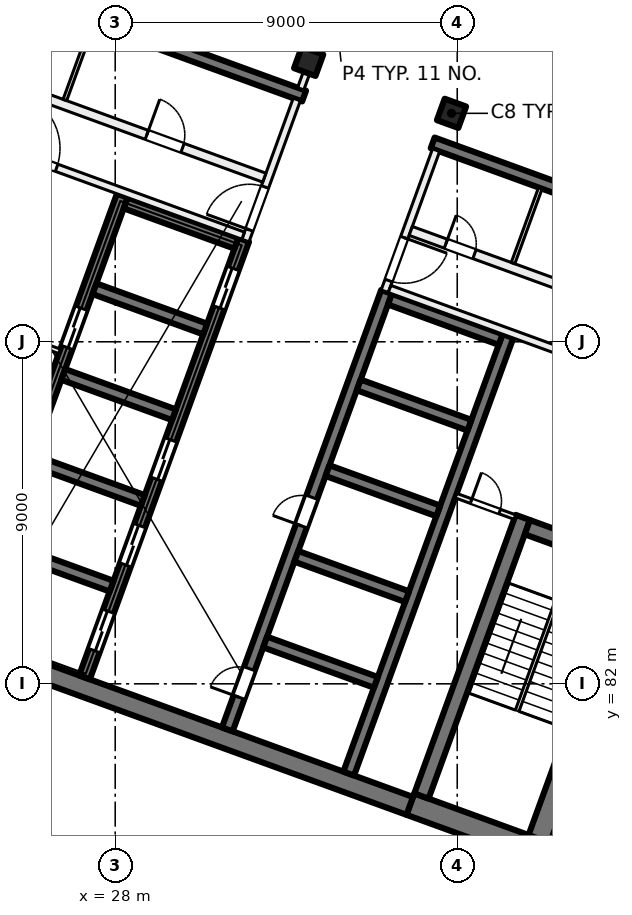
"""IFC4 building model, lengths in metres.
Left out: names, types, materials, properties, quantities, classifications, styles, units other than length and angle.
Written with IfcOpenShell. Run it as: python <this file> out.ifc"""

import sys

from ifc_helpers import new_model, si_unit, direction, frame, frame_2d, origin, origin_2d, place, context, subcontext, project, spatial, rectangle, extrude, element, fill, save


model = new_model("IFC4")
c1 = context("Model", 3, precision=1e-05, world=origin(), true_north=direction((0.0, 1.0)))
c2 = subcontext(c1, "Body", "Model", "MODEL_VIEW")
j1 = project(units=[si_unit("LENGTHUNIT", "METRE"), si_unit("PLANEANGLEUNIT", "RADIAN")], contexts=[c1])
p1 = place(None, origin())
s1 = spatial("IfcSite", under=j1, at=p1, CompositionType="ELEMENT")
p2 = place(p1, origin())
s2 = spatial("IfcBuilding", under=s1, at=p2, CompositionType="ELEMENT")
p3 = place(p2, frame((0.0, 0.0, 228.0)))
s3 = spatial("IfcBuildingStorey", under=s2, at=p3, CompositionType="ELEMENT", Elevation=228.0)
for number, where, z_axis, x_axis in (
    (1, (36.849, 97.011, 0.0), (0.0, 0.0, 1.0), (-0.342, -0.94, 0.0)),
    (2, (33.091, 98.379, 0.0), (0.0, 0.0, 1.0), (-0.342, -0.94, 0.0)),
):
    element("IfcColumn", number, at=place(p3, frame(where, z_axis=z_axis, x_axis=x_axis)), inside=s3, PredefinedType="COLUMN", context=c2, shape_type="SweptSolid", body=[
        extrude(rectangle(XDim=0.6, YDim=0.6, at=origin_2d()), origin(), (0.0, 0.0, 1.0), 4.0),
    ])
p4 = place(p3, frame((39.338, 77.535, 0.0), z_axis=(0.0, 0.0, 1.0), x_axis=(-0.939701471648, 0.341995824804, 0.0)))
e3 = element("IfcWall", 3, at=p4, inside=s3, PredefinedType="SHEAR", context=c2, shape_type="SweptSolid", body=[
    extrude(rectangle(XDim=3.8, YDim=0.6, at=frame_2d((1.9, 0.0))), origin(), (0.0, 0.0, 1.0), 4.0),
])
p5 = place(p3, frame((35.75, 78.788, 0.0), z_axis=(0.0, 0.0, 1.0), x_axis=(-0.939692894512, 0.342019391267, 0.0)))
e4 = element("IfcWall", 4, at=p5, inside=s3, PredefinedType="SHEAR", context=c2, shape_type="SweptSolid", body=[
    extrude(rectangle(XDim=14.4, YDim=0.5, at=frame_2d((7.2, 0.0))), origin(), (0.0, 0.0, 1.0), 4.0),
])
p6 = place(p3, frame((39.159, 77.92, 0.0), z_axis=(0.0, 0.0, 1.0), x_axis=(0.342016982193, 0.939693771338, 0.0)))
e5 = element("IfcWall", 5, at=p6, inside=s3, PredefinedType="SHEAR", context=c2, shape_type="SweptSolid", body=[
    extrude(rectangle(XDim=7.8, YDim=0.6, at=frame_2d((3.9, 0.0))), origin(), (0.0, 0.0, 1.0), 4.0),
])
p7 = place(p3, frame((36.058, 79.048, 0.0), z_axis=(0.0, 0.0, 1.0), x_axis=(0.342016982193, 0.939693771338, 0.0)))
e6 = element("IfcWall", 6, at=p7, inside=s3, PredefinedType="SHEAR", context=c2, shape_type="SweptSolid", body=[
    extrude(rectangle(XDim=7.8, YDim=0.4, at=frame_2d((3.9, 0.0))), origin(), (0.0, 0.0, 1.0), 4.0),
])
p8 = place(p3, frame((41.476, 85.164, 0.0), z_axis=(0.0, 0.0, 1.0), x_axis=(-0.939678810556, 0.342058084236, 0.0)))
e7 = element("IfcWall", 7, at=p8, inside=s3, PredefinedType="SHEAR", context=c2, shape_type="SweptSolid", body=[
    extrude(rectangle(XDim=2.8, YDim=0.4, at=frame_2d((1.4, 0.0))), origin(), (0.0, 0.0, 1.0), 4.0),
])
p9 = place(p8, frame((0.85, 0.0, 0.0)))
e8 = element("IfcOpeningElement", 8, at=p9, cuts=e7, PredefinedType="OPENING", context=c2, shape_type="SweptSolid", body=[
    extrude(rectangle(XDim=1.0, YDim=2.1, at=frame_2d((0.5, 1.05))), frame((0.0, 0.21, 0.0), z_axis=(0.0, -1.0, 0.0), x_axis=(1.0, 0.0, 0.0)), (0.0, 0.0, 1.0), 0.42),
])
p10 = place(p3, frame((30.949, 80.801, 0.0), z_axis=(0.0, 0.0, 1.0), x_axis=(0.342016684409, 0.939693879721, 0.0)))
e9 = element("IfcWall", 9, at=p10, inside=s3, PredefinedType="SHEAR", context=c2, shape_type="SweptSolid", body=[
    extrude(rectangle(XDim=12.25, YDim=0.3, at=frame_2d((6.125, 0.0))), origin(), (0.0, 0.0, 1.0), 4.0),
])
p11 = place(p10, frame((0.9, 0.0, 0.0)))
e10 = element("IfcOpeningElement", 10, at=p11, cuts=e9, PredefinedType="OPENING", context=c2, shape_type="SweptSolid", body=[
    extrude(rectangle(XDim=0.8, YDim=2.1, at=frame_2d((0.4, 1.05))), frame((0.0, 0.16, 0.0), z_axis=(0.0, -1.0, 0.0), x_axis=(1.0, 0.0, 0.0)), (0.0, 0.0, 1.0), 0.32),
])
p12 = place(p10, frame((5.7, 0.0, 0.0)))
e11 = element("IfcOpeningElement", 11, at=p12, cuts=e9, PredefinedType="OPENING", context=c2, shape_type="SweptSolid", body=[
    extrude(rectangle(XDim=0.8, YDim=2.1, at=frame_2d((0.4, 1.05))), frame((0.0, 0.16, 0.0), z_axis=(0.0, -1.0, 0.0), x_axis=(1.0, 0.0, 0.0)), (0.0, 0.0, 1.0), 0.32),
])
p13 = place(p3, frame((34.144, 79.638, 0.0), z_axis=(0.0, 0.0, 1.0), x_axis=(0.342016684409, 0.939693879721, 0.0)))
e12 = element("IfcWall", 12, at=p13, inside=s3, PredefinedType="SHEAR", context=c2, shape_type="SweptSolid", body=[
    extrude(rectangle(XDim=12.25, YDim=0.3, at=frame_2d((6.125, 0.0))), origin(), (0.0, 0.0, 1.0), 4.0),
])
p14 = place(p3, frame((34.858, 82.039, 0.0), z_axis=(0.0, 0.0, 1.0), x_axis=(-0.939689908313, 0.342027595692, 0.0)))
e13 = element("IfcWall", 13, at=p14, inside=s3, PredefinedType="SHEAR", context=c2, shape_type="SweptSolid", body=[
    extrude(rectangle(XDim=3.1, YDim=0.3, at=frame_2d((1.55, 0.0))), origin(), (0.0, 0.0, 1.0), 4.0),
])
p15 = place(p3, frame((35.679, 84.294, 0.0), z_axis=(0.0, 0.0, 1.0), x_axis=(-0.939706007505, 0.341983361377, 0.0)))
e14 = element("IfcWall", 14, at=p15, inside=s3, PredefinedType="SHEAR", context=c2, shape_type="SweptSolid", body=[
    extrude(rectangle(XDim=3.1, YDim=0.3, at=frame_2d((1.55, 0.0))), origin(), (0.0, 0.0, 1.0), 4.0),
])
for number, where, z_axis, x_axis in (
    (15, (36.5, 86.549, 0.0), (0.0, 0.0, 1.0), (-0.94, 0.342, 0.0)),
    (16, (37.321, 88.805, 0.0), (0.0, 0.0, 1.0), (-0.94, 0.342, 0.0)),
    (17, (38.142, 91.06, 0.0), (0.0, 0.0, 1.0), (-0.94, 0.342, 0.0)),
):
    element("IfcWall", number, at=place(p3, frame(where, z_axis=z_axis, x_axis=x_axis)), inside=s3, PredefinedType="SHEAR", context=c2, shape_type="SweptSolid", body=[
        extrude(rectangle(XDim=3.1, YDim=0.3, at=frame_2d((1.55, 0.0))), origin(), (0.0, 0.0, 1.0), 4.0),
    ])
p16 = place(p3, frame((27.191, 82.169, 0.0), z_axis=(0.0, 0.0, 1.0), x_axis=(0.342016684409, 0.939693879721, 0.0)))
e18 = element("IfcWall", 18, at=p16, inside=s3, PredefinedType="SHEAR", context=c2, shape_type="SweptSolid", body=[
    extrude(rectangle(XDim=12.25, YDim=0.3, at=frame_2d((6.125, 0.0))), origin(), (0.0, 0.0, 1.0), 4.0),
])
p17 = place(p16, frame((0.75, 0.0, 0.0)))
e19 = element("IfcOpeningElement", 19, at=p17, cuts=e18, PredefinedType="OPENING", context=c2, shape_type="SweptSolid", body=[
    extrude(rectangle(XDim=1.1, YDim=2.1, at=frame_2d((0.55, 1.05))), frame((0.0, 0.16, 0.0), z_axis=(0.0, -1.0, 0.0), x_axis=(1.0, 0.0, 0.0)), (0.0, 0.0, 1.0), 0.32),
])
p18 = place(p16, frame((3.15, 0.0, 0.0)))
e20 = element("IfcOpeningElement", 20, at=p18, cuts=e18, PredefinedType="OPENING", context=c2, shape_type="SweptSolid", body=[
    extrude(rectangle(XDim=1.1, YDim=2.1, at=frame_2d((0.55, 1.05))), frame((0.0, 0.16, 0.0), z_axis=(0.0, -1.0, 0.0), x_axis=(1.0, 0.0, 0.0)), (0.0, 0.0, 1.0), 0.32),
])
p19 = place(p16, frame((5.55, 0.0, 0.0)))
e21 = element("IfcOpeningElement", 21, at=p19, cuts=e18, PredefinedType="OPENING", context=c2, shape_type="SweptSolid", body=[
    extrude(rectangle(XDim=1.1, YDim=2.1, at=frame_2d((0.55, 1.05))), frame((0.0, 0.16, 0.0), z_axis=(0.0, -1.0, 0.0), x_axis=(1.0, 0.0, 0.0)), (0.0, 0.0, 1.0), 0.32),
])
p20 = place(p16, frame((10.35, 0.0, 0.0)))
e22 = element("IfcOpeningElement", 22, at=p20, cuts=e18, PredefinedType="OPENING", context=c2, shape_type="SweptSolid", body=[
    extrude(rectangle(XDim=1.1, YDim=2.1, at=frame_2d((0.55, 1.05))), frame((0.0, 0.16, 0.0), z_axis=(0.0, -1.0, 0.0), x_axis=(1.0, 0.0, 0.0)), (0.0, 0.0, 1.0), 0.32),
])
p21 = place(p3, frame((23.996, 83.332, 0.0), z_axis=(0.0, 0.0, 1.0), x_axis=(0.342016684409, 0.939693879721, 0.0)))
e23 = element("IfcWall", 23, at=p21, inside=s3, PredefinedType="SHEAR", context=c2, shape_type="SweptSolid", body=[
    extrude(rectangle(XDim=12.25, YDim=0.3, at=frame_2d((6.125, 0.0))), origin(), (0.0, 0.0, 1.0), 4.0),
])
p22 = place(p21, frame((8.0, 0.0, 0.0)))
e24 = element("IfcOpeningElement", 24, at=p22, cuts=e23, PredefinedType="OPENING", context=c2, shape_type="SweptSolid", body=[
    extrude(rectangle(XDim=1.1, YDim=2.1, at=frame_2d((0.55, 1.05))), frame((0.0, 0.16, 0.0), z_axis=(0.0, -1.0, 0.0), x_axis=(1.0, 0.0, 0.0)), (0.0, 0.0, 1.0), 0.32),
])
for number, where, z_axis, x_axis in (
    (25, (27.905, 84.57, 0.0), (0.0, 0.0, 1.0), (-0.94, 0.342, 0.0)),
    (26, (28.726, 86.825, 0.0), (0.0, 0.0, 1.0), (-0.94, 0.342, 0.0)),
    (27, (29.546, 89.08, 0.0), (0.0, 0.0, 1.0), (-0.94, 0.342, 0.0)),
):
    element("IfcWall", number, at=place(p3, frame(where, z_axis=z_axis, x_axis=x_axis)), inside=s3, PredefinedType="SHEAR", context=c2, shape_type="SweptSolid", body=[
        extrude(rectangle(XDim=3.1, YDim=0.3, at=frame_2d((1.55, 0.0))), origin(), (0.0, 0.0, 1.0), 4.0),
    ])
for number, where, z_axis, x_axis in (
    (28, (30.367, 91.336, 0.0), (0.0, 0.0, 1.0), (-0.94, 0.342, 0.0)),
    (29, (31.188, 93.591, 0.0), (0.0, 0.0, 1.0), (-0.94, 0.342, 0.0)),
):
    element("IfcWall", number, at=place(p3, frame(where, z_axis=z_axis, x_axis=x_axis)), inside=s3, PredefinedType="SHEAR", context=c2, shape_type="SweptSolid", body=[
        extrude(rectangle(XDim=3.1, YDim=0.3, at=frame_2d((1.55, 0.0))), origin(), (0.0, 0.0, 1.0), 4.0),
    ])
p23 = place(p3, frame((44.529, 93.258, 0.0), z_axis=(0.0, 0.0, 1.0), x_axis=(-0.9396917844, 0.342022441267, 0.0)))
e30 = element("IfcWall", 30, at=p23, inside=s3, PredefinedType="SHEAR", context=c2, shape_type="SweptSolid", body=[
    extrude(rectangle(XDim=8.7, YDim=0.3, at=frame_2d((4.35, 0.0))), origin(), (0.0, 0.0, 1.0), 4.0),
])
p24 = place(p3, frame((32.971, 97.465, 0.0), z_axis=(0.0, 0.0, 1.0), x_axis=(-0.939695066972, 0.34201342241, 0.0)))
e31 = element("IfcWall", 31, at=p24, inside=s3, PredefinedType="SHEAR", context=c2, shape_type="SweptSolid", body=[
    extrude(rectangle(XDim=8.7, YDim=0.3, at=frame_2d((4.35, 0.0))), origin(), (0.0, 0.0, 1.0), 4.0),
])
p25 = place(p3, frame((31.427, 93.663, 0.0), z_axis=(0.0, 0.0, 1.0), x_axis=(0.342030870568, 0.93968871632, 0.0)))
e32 = element("IfcWall", 32, at=p25, inside=s3, PredefinedType="PARTITIONING", context=c2, shape_type="SweptSolid", body=[
    extrude(rectangle(XDim=3.95, YDim=0.2, at=frame_2d((1.975, 0.0))), origin(), (0.0, 0.0, 1.0), 3.625),
])
p26 = place(p25, frame((0.3, 0.0, 0.0)))
e33 = element("IfcOpeningElement", 33, at=p26, cuts=e32, PredefinedType="OPENING", context=c2, shape_type="SweptSolid", body=[
    extrude(rectangle(XDim=1.2, YDim=2.1, at=frame_2d((0.6, 1.05))), frame((0.0, 0.11, 0.0), z_axis=(0.0, -1.0, 0.0), x_axis=(1.0, 0.0, 0.0)), (0.0, 0.0, 1.0), 0.22),
])
p27 = place(p3, frame((23.427, 96.682, 0.0), z_axis=(0.0, 0.0, 1.0), x_axis=(0.939690465531, -0.342026064782, 0.0)))
e34 = element("IfcWall", 34, at=p27, inside=s3, PredefinedType="PARTITIONING", context=c2, shape_type="SweptSolid", body=[
    extrude(rectangle(XDim=8.45, YDim=0.2, at=frame_2d((4.225, 0.0))), origin(), (0.0, 0.0, 1.0), 3.625),
])
p28 = place(p27, frame((1.725, 0.0, 0.0)))
e35 = element("IfcOpeningElement", 35, at=p28, cuts=e34, PredefinedType="OPENING", context=c2, shape_type="SweptSolid", body=[
    extrude(rectangle(XDim=1.5, YDim=2.1, at=frame_2d((0.75, 1.05))), frame((0.0, 0.11, 0.0), z_axis=(0.0, -1.0, 0.0), x_axis=(1.0, 0.0, 0.0)), (0.0, 0.0, 1.0), 0.22),
])
p29 = place(p3, frame((23.983, 98.208, 0.0), z_axis=(0.0, 0.0, 1.0), x_axis=(0.939699751196, -0.342000552051, 0.0)))
e36 = element("IfcWall", 36, at=p29, inside=s3, PredefinedType="PARTITIONING", context=c2, shape_type="SweptSolid", body=[
    extrude(rectangle(XDim=8.45, YDim=0.25, at=frame_2d((4.225, 0.0))), origin(), (0.0, 0.0, 1.0), 3.625),
])
p30 = place(p29, frame((5.16, 0.0, 0.0)))
e37 = element("IfcOpeningElement", 37, at=p30, cuts=e36, PredefinedType="OPENING", context=c2, shape_type="SweptSolid", body=[
    extrude(rectangle(XDim=1.0, YDim=2.1, at=frame_2d((0.5, 1.05))), frame((0.0, 0.135, 0.0), z_axis=(0.0, -1.0, 0.0), x_axis=(1.0, 0.0, 0.0)), (0.0, 0.0, 1.0), 0.27),
])
p31 = place(p29, frame((0.885, 0.0, 0.0)))
e38 = element("IfcOpeningElement", 38, at=p31, cuts=e36, PredefinedType="OPENING", context=c2, shape_type="SweptSolid", body=[
    extrude(rectangle(XDim=1.0, YDim=2.1, at=frame_2d((0.5, 1.05))), frame((0.0, 0.135, 0.0), z_axis=(0.0, -1.0, 0.0), x_axis=(1.0, 0.0, 0.0)), (0.0, 0.0, 1.0), 0.27),
])
p32 = place(p3, frame((24.985, 91.312, 0.0), z_axis=(0.0, 0.0, 1.0), x_axis=(0.939719959755, -0.341945020783, 0.0)))
e39 = element("IfcWall", 39, at=p32, inside=s3, PredefinedType="PARTITIONING", context=c2, shape_type="SweptSolid", body=[
    extrude(rectangle(XDim=1.65, YDim=0.125, at=frame_2d((0.825, 0.0))), origin(), (0.0, 0.0, 1.0), 3.625),
])
p33 = place(p32, frame((0.425, 0.0, 0.0)))
e40 = element("IfcOpeningElement", 40, at=p33, cuts=e39, PredefinedType="OPENING", context=c2, shape_type="SweptSolid", body=[
    extrude(rectangle(XDim=0.8, YDim=2.1, at=frame_2d((0.4, 1.05))), frame((0.0, 0.073, 0.0), z_axis=(0.0, -1.0, 0.0), x_axis=(1.0, 0.0, 0.0)), (0.0, 0.0, 1.0), 0.145),
])
p34 = place(p3, frame((26.676, 97.362, 0.0), z_axis=(0.0, 0.0, 1.0), x_axis=(0.342023078919, 0.939691552312, 0.0)))
e41 = element("IfcWall", 41, at=p34, inside=s3, PredefinedType="PARTITIONING", context=c2, shape_type="SweptSolid", body=[
    extrude(rectangle(XDim=2.1, YDim=0.1, at=frame_2d((1.05, 0.0))), origin(), (0.0, 0.0, 1.0), 3.625),
])
p35 = place(p3, frame((36.443, 96.041, 0.0), z_axis=(0.0, 0.0, 1.0), x_axis=(-0.341996156931, -0.939701350773, 0.0)))
e42 = element("IfcWall", 42, at=p35, inside=s3, PredefinedType="PARTITIONING", context=c2, shape_type="SweptSolid", body=[
    extrude(rectangle(XDim=3.95, YDim=0.2, at=frame_2d((1.975, 0.0))), origin(), (0.0, 0.0, 1.0), 3.625),
])
p36 = place(p35, frame((2.45, 0.0, 0.0)))
e43 = element("IfcOpeningElement", 43, at=p36, cuts=e42, PredefinedType="OPENING", context=c2, shape_type="SweptSolid", body=[
    extrude(rectangle(XDim=1.2, YDim=2.1, at=frame_2d((0.6, 1.05))), frame((0.0, 0.11, 0.0), z_axis=(0.0, -1.0, 0.0), x_axis=(1.0, 0.0, 0.0)), (0.0, 0.0, 1.0), 0.22),
])
p37 = place(p3, frame((35.22, 92.389, 0.0), z_axis=(0.0, 0.0, 1.0), x_axis=(0.939690465531, -0.342026064782, 0.0)))
e44 = element("IfcWall", 44, at=p37, inside=s3, PredefinedType="PARTITIONING", context=c2, shape_type="SweptSolid", body=[
    extrude(rectangle(XDim=8.45, YDim=0.2, at=frame_2d((4.225, 0.0))), origin(), (0.0, 0.0, 1.0), 3.625),
])
p38 = place(p37, frame((5.225, 0.0, 0.0)))
e45 = element("IfcOpeningElement", 45, at=p38, cuts=e44, PredefinedType="OPENING", context=c2, shape_type="SweptSolid", body=[
    extrude(rectangle(XDim=1.5, YDim=2.1, at=frame_2d((0.75, 1.05))), frame((0.0, 0.11, 0.0), z_axis=(0.0, -1.0, 0.0), x_axis=(1.0, 0.0, 0.0)), (0.0, 0.0, 1.0), 0.22),
])
p39 = place(p3, frame((35.776, 93.916, 0.0), z_axis=(0.0, 0.0, 1.0), x_axis=(0.939690465531, -0.342026064782, 0.0)))
e46 = element("IfcWall", 46, at=p39, inside=s3, PredefinedType="PARTITIONING", context=c2, shape_type="SweptSolid", body=[
    extrude(rectangle(XDim=8.45, YDim=0.25, at=frame_2d((4.225, 0.0))), origin(), (0.0, 0.0, 1.0), 3.625),
])
p40 = place(p39, frame((0.985, 0.0, 0.0)))
e47 = element("IfcOpeningElement", 47, at=p40, cuts=e46, PredefinedType="OPENING", context=c2, shape_type="SweptSolid", body=[
    extrude(rectangle(XDim=0.8, YDim=2.1, at=frame_2d((0.4, 1.05))), frame((0.0, 0.135, 0.0), z_axis=(0.0, -1.0, 0.0), x_axis=(1.0, 0.0, 0.0)), (0.0, 0.0, 1.0), 0.27),
])
p41 = place(p39, frame((5.26, 0.0, 0.0)))
e48 = element("IfcOpeningElement", 48, at=p41, cuts=e46, PredefinedType="OPENING", context=c2, shape_type="SweptSolid", body=[
    extrude(rectangle(XDim=0.8, YDim=2.1, at=frame_2d((0.4, 1.05))), frame((0.0, 0.135, 0.0), z_axis=(0.0, -1.0, 0.0), x_axis=(1.0, 0.0, 0.0)), (0.0, 0.0, 1.0), 0.27),
])
p42 = place(p3, frame((36.966, 86.952, 0.0), z_axis=(0.0, 0.0, 1.0), x_axis=(0.939672407396, -0.342075674051, 0.0)))
e49 = element("IfcWall", 49, at=p42, inside=s3, PredefinedType="PARTITIONING", context=c2, shape_type="SweptSolid", body=[
    extrude(rectangle(XDim=1.65, YDim=0.125, at=frame_2d((0.825, 0.0))), origin(), (0.0, 0.0, 1.0), 3.625),
])
p43 = place(p42, frame((0.425, 0.0, 0.0)))
e50 = element("IfcOpeningElement", 50, at=p43, cuts=e49, PredefinedType="OPENING", context=c2, shape_type="SweptSolid", body=[
    extrude(rectangle(XDim=0.8, YDim=2.1, at=frame_2d((0.4, 1.05))), frame((0.0, 0.073, 0.0), z_axis=(0.0, -1.0, 0.0), x_axis=(1.0, 0.0, 0.0)), (0.0, 0.0, 1.0), 0.145),
])
p44 = place(p3, frame((39.187, 95.042, 0.0), z_axis=(0.0, 0.0, 1.0), x_axis=(-0.342023078919, -0.939691552312, 0.0)))
e51 = element("IfcWall", 51, at=p44, inside=s3, PredefinedType="PARTITIONING", context=c2, shape_type="SweptSolid", body=[
    extrude(rectangle(XDim=2.1, YDim=0.1, at=frame_2d((1.05, 0.0))), origin(), (0.0, 0.0, 1.0), 3.625),
])
p45 = place(p3, frame((32.881, 97.657, 0.0), z_axis=(0.0, 0.0, 1.0), x_axis=(0.342058204353, 0.939678766832, 0.0)))
e52 = element("IfcWall", 52, at=p45, inside=s3, PredefinedType="PARTITIONING", context=c2, shape_type="SweptSolid", body=[
    extrude(rectangle(XDim=5.163, YDim=0.175, at=frame_2d((2.581, 0.0))), origin(), (0.0, 0.0, 1.0), 3.625),
])
p46 = place(p45, frame((1.991, 0.0, 0.0)))
e53 = element("IfcOpeningElement", 53, at=p46, cuts=e52, PredefinedType="OPENING", context=c2, shape_type="SweptSolid", body=[
    extrude(rectangle(XDim=1.2, YDim=2.1, at=frame_2d((0.6, 1.05))), frame((0.0, 0.097, 0.0), z_axis=(0.0, -1.0, 0.0), x_axis=(1.0, 0.0, 0.0)), (0.0, 0.0, 1.0), 0.195),
])
p47 = place(p17, origin())
e54 = element("IfcDoor", 54, at=p47, inside=s3, OperationType="DOUBLE_DOOR_SLIDING", PredefinedType="DOOR", context=c2, shape_type="SweptSolid", body=[
    extrude(rectangle(XDim=1.1, YDim=2.1, at=frame_2d((0.55, 1.05))), frame((0.0, 0.025, 0.0), z_axis=(0.0, -1.0, 0.0), x_axis=(1.0, 0.0, 0.0)), (0.0, 0.0, 1.0), 0.05),
])
fill(e19, e54)
p48 = place(p18, origin())
e55 = element("IfcDoor", 55, at=p48, inside=s3, OperationType="DOUBLE_DOOR_SLIDING", PredefinedType="DOOR", context=c2, shape_type="SweptSolid", body=[
    extrude(rectangle(XDim=1.1, YDim=2.1, at=frame_2d((0.55, 1.05))), frame((0.0, 0.025, 0.0), z_axis=(0.0, -1.0, 0.0), x_axis=(1.0, 0.0, 0.0)), (0.0, 0.0, 1.0), 0.05),
])
fill(e20, e55)
p49 = place(p19, origin())
e56 = element("IfcDoor", 56, at=p49, inside=s3, OperationType="DOUBLE_DOOR_SLIDING", PredefinedType="DOOR", context=c2, shape_type="SweptSolid", body=[
    extrude(rectangle(XDim=1.1, YDim=2.1, at=frame_2d((0.55, 1.05))), frame((0.0, 0.025, 0.0), z_axis=(0.0, -1.0, 0.0), x_axis=(1.0, 0.0, 0.0)), (0.0, 0.0, 1.0), 0.05),
])
fill(e21, e56)
p50 = place(p20, origin())
e57 = element("IfcDoor", 57, at=p50, inside=s3, OperationType="DOUBLE_DOOR_SLIDING", PredefinedType="DOOR", context=c2, shape_type="SweptSolid", body=[
    extrude(rectangle(XDim=1.1, YDim=2.1, at=frame_2d((0.55, 1.05))), frame((0.0, 0.025, 0.0), z_axis=(0.0, -1.0, 0.0), x_axis=(1.0, 0.0, 0.0)), (0.0, 0.0, 1.0), 0.05),
])
fill(e22, e57)
p51 = place(p11, origin())
e58 = element("IfcDoor", 58, at=p51, inside=s3, OperationType="SINGLE_SWING_LEFT", PredefinedType="DOOR", context=c2, shape_type="SweptSolid", body=[
    extrude(rectangle(XDim=0.8, YDim=2.1, at=frame_2d((0.4, 1.05))), frame((0.0, 0.025, 0.0), z_axis=(0.0, -1.0, 0.0), x_axis=(1.0, 0.0, 0.0)), (0.0, 0.0, 1.0), 0.05),
])
fill(e10, e58)
p52 = place(p12, origin())
e59 = element("IfcDoor", 59, at=p52, inside=s3, OperationType="SINGLE_SWING_RIGHT", PredefinedType="DOOR", context=c2, shape_type="SweptSolid", body=[
    extrude(rectangle(XDim=0.8, YDim=2.1, at=frame_2d((0.4, 1.05))), frame((0.0, 0.025, 0.0), z_axis=(0.0, -1.0, 0.0), x_axis=(1.0, 0.0, 0.0)), (0.0, 0.0, 1.0), 0.05),
])
fill(e11, e59)
p53 = place(p26, origin())
e60 = element("IfcDoor", 60, at=p53, inside=s3, OperationType="DOUBLE_DOOR_SINGLE_SWING", PredefinedType="DOOR", context=c2, shape_type="SweptSolid", body=[
    extrude(rectangle(XDim=1.2, YDim=2.1, at=frame_2d((0.6, 1.05))), frame((0.0, 0.025, 0.0), z_axis=(0.0, -1.0, 0.0), x_axis=(1.0, 0.0, 0.0)), (0.0, 0.0, 1.0), 0.05),
])
fill(e33, e60)
p54 = place(p28, origin())
e61 = element("IfcDoor", 61, at=p54, inside=s3, OperationType="DOUBLE_DOOR_SINGLE_SWING", PredefinedType="DOOR", context=c2, shape_type="SweptSolid", body=[
    extrude(rectangle(XDim=1.5, YDim=2.1, at=frame_2d((0.75, 1.05))), frame((0.0, 0.025, 0.0), z_axis=(0.0, -1.0, 0.0), x_axis=(1.0, 0.0, 0.0)), (0.0, 0.0, 1.0), 0.05),
])
fill(e35, e61)
p55 = place(p30, origin())
e62 = element("IfcDoor", 62, at=p55, inside=s3, OperationType="SINGLE_SWING_LEFT", PredefinedType="DOOR", context=c2, shape_type="SweptSolid", body=[
    extrude(rectangle(XDim=1.0, YDim=2.1, at=frame_2d((0.5, 1.05))), frame((0.0, 0.025, 0.0), z_axis=(0.0, -1.0, 0.0), x_axis=(1.0, 0.0, 0.0)), (0.0, 0.0, 1.0), 0.05),
])
fill(e37, e62)
p56 = place(p36, origin())
e63 = element("IfcDoor", 63, at=p56, inside=s3, OperationType="DOUBLE_DOOR_SINGLE_SWING", PredefinedType="DOOR", context=c2, shape_type="SweptSolid", body=[
    extrude(rectangle(XDim=1.2, YDim=2.1, at=frame_2d((0.6, 1.05))), frame((0.0, 0.025, 0.0), z_axis=(0.0, -1.0, 0.0), x_axis=(1.0, 0.0, 0.0)), (0.0, 0.0, 1.0), 0.05),
])
fill(e43, e63)
p57 = place(p43, origin())
e64 = element("IfcDoor", 64, at=p57, inside=s3, OperationType="SINGLE_SWING_LEFT", PredefinedType="DOOR", context=c2, shape_type="SweptSolid", body=[
    extrude(rectangle(XDim=0.8, YDim=2.1, at=frame_2d((0.4, 1.05))), frame((0.0, 0.025, 0.0), z_axis=(0.0, -1.0, 0.0), x_axis=(1.0, 0.0, 0.0)), (0.0, 0.0, 1.0), 0.05),
])
fill(e50, e64)
p58 = place(p40, origin())
e65 = element("IfcDoor", 65, at=p58, inside=s3, OperationType="SINGLE_SWING_RIGHT", PredefinedType="DOOR", context=c2, shape_type="SweptSolid", body=[
    extrude(rectangle(XDim=0.8, YDim=2.1, at=frame_2d((0.4, 1.05))), frame((0.0, 0.025, 0.0), z_axis=(0.0, -1.0, 0.0), x_axis=(1.0, 0.0, 0.0)), (0.0, 0.0, 1.0), 0.05),
])
fill(e47, e65)
p59 = place(p22, origin())
e66 = element("IfcDoor", 66, at=p59, inside=s3, OperationType="DOUBLE_DOOR_SLIDING", PredefinedType="DOOR", context=c2, shape_type="SweptSolid", body=[
    extrude(rectangle(XDim=1.1, YDim=2.1, at=frame_2d((0.55, 1.05))), frame((0.0, 0.025, 0.0), z_axis=(0.0, -1.0, 0.0), x_axis=(1.0, 0.0, 0.0)), (0.0, 0.0, 1.0), 0.05),
])
fill(e24, e66)
save(model, sys.argv[1])
